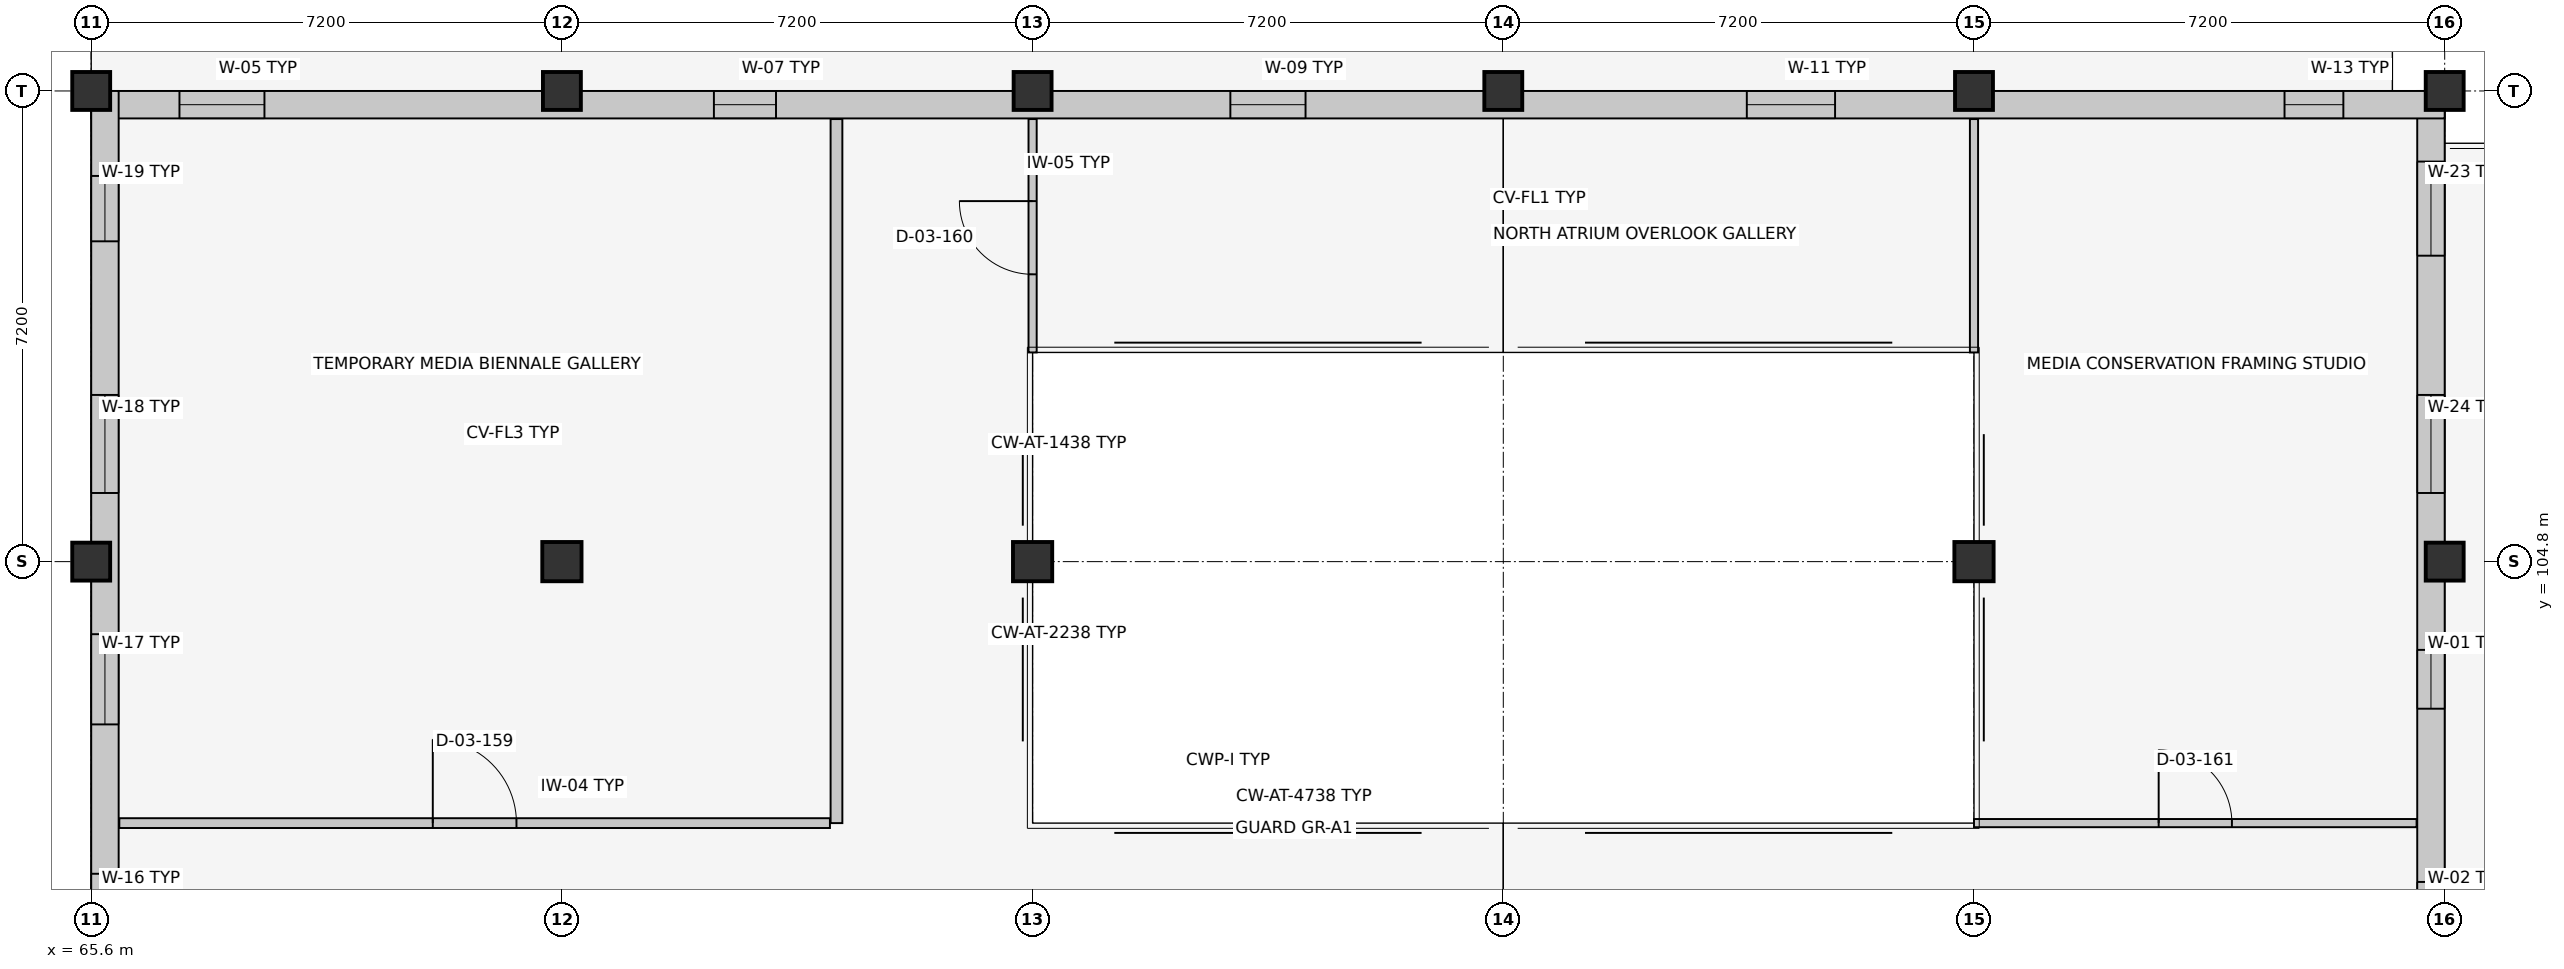
"""IFC4 building model, lengths in metres.
Left out: names, types, materials, properties, quantities, classifications, styles, units other than length and angle.
Written with IfcOpenShell. Run it as: python <this file> out.ifc"""

import sys

from ifc_helpers import new_model, si_unit, direction, frame, frame_2d, origin, origin_2d, place, context, subcontext, project, spatial, rectangle, extrude, element, fill, save


model = new_model("IFC4")
c1 = context("Model", 3, precision=1e-05, world=origin(), true_north=direction((0.0, 1.0)))
c2 = subcontext(c1, "Body", "Model", "MODEL_VIEW")
j1 = project(units=[si_unit("LENGTHUNIT", "METRE"), si_unit("PLANEANGLEUNIT", "RADIAN")], contexts=[c1])
p1 = place(None, origin())
s1 = spatial("IfcSite", under=j1, at=p1, CompositionType="ELEMENT")
p2 = place(p1, origin())
s2 = spatial("IfcBuilding", under=s1, at=p2, CompositionType="ELEMENT")
p3 = place(p2, frame((0.0, 0.0, 13.8)))
s3 = spatial("IfcBuildingStorey", under=s2, at=p3, CompositionType="ELEMENT", Elevation=13.8)
for number, where, z_axis, x_axis in (
    (1, (65.6, 104.8, 0.0), (0.0, 0.0, 1.0), (1.0, 0.0, 0.0)),
    (2, (65.6, 112.0, 0.0), (0.0, 0.0, 1.0), (1.0, 0.0, 0.0)),
):
    element("IfcColumn", number, at=place(p3, frame(where, z_axis=z_axis, x_axis=x_axis)), inside=s3, PredefinedType="COLUMN", context=c2, shape_type="SweptSolid", body=[
        extrude(rectangle(XDim=0.58, YDim=0.58, at=origin_2d()), origin(), (0.0, 0.0, 1.0), 4.2),
    ])
p4 = place(p3, frame((72.8, 104.8, 0.0), z_axis=(0.0, 0.0, 1.0), x_axis=(1.0, 0.0, 0.0)))
e3 = element("IfcColumn", 3, at=p4, inside=s3, PredefinedType="COLUMN", context=c2, shape_type="SweptSolid", body=[
    extrude(rectangle(XDim=0.6, YDim=0.6, at=origin_2d()), origin(), (0.0, 0.0, 1.0), 4.2),
])
p5 = place(p3, frame((72.8, 112.0, 0.0), z_axis=(0.0, 0.0, 1.0), x_axis=(1.0, 0.0, 0.0)))
e4 = element("IfcColumn", 4, at=p5, inside=s3, PredefinedType="COLUMN", context=c2, shape_type="SweptSolid", body=[
    extrude(rectangle(XDim=0.58, YDim=0.58, at=origin_2d()), origin(), (0.0, 0.0, 1.0), 4.2),
])
p6 = place(p3, frame((80.0, 104.8, 0.0), z_axis=(0.0, 0.0, 1.0), x_axis=(1.0, 0.0, 0.0)))
e5 = element("IfcColumn", 5, at=p6, inside=s3, PredefinedType="COLUMN", context=c2, shape_type="SweptSolid", body=[
    extrude(rectangle(XDim=0.6, YDim=0.6, at=origin_2d()), origin(), (0.0, 0.0, 1.0), 4.2),
])
for number, where, z_axis, x_axis in (
    (6, (80.0, 112.0, 0.0), (0.0, 0.0, 1.0), (1.0, 0.0, 0.0)),
    (7, (87.2, 112.0, 0.0), (0.0, 0.0, 1.0), (1.0, 0.0, 0.0)),
):
    element("IfcColumn", number, at=place(p3, frame(where, z_axis=z_axis, x_axis=x_axis)), inside=s3, PredefinedType="COLUMN", context=c2, shape_type="SweptSolid", body=[
        extrude(rectangle(XDim=0.58, YDim=0.58, at=origin_2d()), origin(), (0.0, 0.0, 1.0), 4.2),
    ])
p7 = place(p3, frame((94.4, 104.8, 0.0), z_axis=(0.0, 0.0, 1.0), x_axis=(1.0, 0.0, 0.0)))
e8 = element("IfcColumn", 8, at=p7, inside=s3, PredefinedType="COLUMN", context=c2, shape_type="SweptSolid", body=[
    extrude(rectangle(XDim=0.6, YDim=0.6, at=origin_2d()), origin(), (0.0, 0.0, 1.0), 4.2),
])
for number, where, z_axis, x_axis in (
    (9, (94.4, 112.0, 0.0), (0.0, 0.0, 1.0), (1.0, 0.0, 0.0)),
    (10, (101.6, 104.8, 0.0), (0.0, 0.0, 1.0), (1.0, 0.0, 0.0)),
    (11, (101.6, 112.0, 0.0), (0.0, 0.0, 1.0), (1.0, 0.0, 0.0)),
):
    element("IfcColumn", number, at=place(p3, frame(where, z_axis=z_axis, x_axis=x_axis)), inside=s3, PredefinedType="COLUMN", context=c2, shape_type="SweptSolid", body=[
        extrude(rectangle(XDim=0.58, YDim=0.58, at=origin_2d()), origin(), (0.0, 0.0, 1.0), 4.2),
    ])
p8 = place(p3, frame((101.39, 112.0, 0.0), z_axis=(0.0, 0.0, 1.0), x_axis=(0.0, -1.0, 0.0)))
e12 = element("IfcWall", 12, at=p8, inside=s3, PredefinedType="SOLIDWALL", context=c2, shape_type="SweptSolid", body=[
    extrude(rectangle(XDim=21.6, YDim=0.42, at=frame_2d((10.8, 0.0))), origin(), (0.0, 0.0, 1.0), 3.215),
])
p9 = place(p8, frame((17.3, 0.0, 0.0)))
e13 = element("IfcOpeningElement", 13, at=p9, cuts=e12, PredefinedType="OPENING", context=c2, shape_type="SweptSolid", body=[
    extrude(rectangle(XDim=1.4, YDim=2.2, at=frame_2d((0.7, 1.1))), frame((0.0, 0.222, 0.0), z_axis=(0.0, -1.0, 0.0), x_axis=(1.0, 0.0, 0.0)), (0.0, 0.0, 1.0), 0.444),
])
p10 = place(p8, frame((1.08, 0.0, 0.9)))
e14 = element("IfcOpeningElement", 14, at=p10, cuts=e12, PredefinedType="OPENING", context=c2, shape_type="SweptSolid", body=[
    extrude(rectangle(XDim=1.44, YDim=1.75, at=frame_2d((0.72, 0.875))), frame((0.0, 0.222, 0.0), z_axis=(0.0, -1.0, 0.0), x_axis=(1.0, 0.0, 0.0)), (0.0, 0.0, 1.0), 0.444),
])
p11 = place(p8, frame((4.65, 0.0, 0.9)))
e15 = element("IfcOpeningElement", 15, at=p11, cuts=e12, PredefinedType="OPENING", context=c2, shape_type="SweptSolid", body=[
    extrude(rectangle(XDim=1.5, YDim=1.75, at=frame_2d((0.75, 0.875))), frame((0.0, 0.222, 0.0), z_axis=(0.0, -1.0, 0.0), x_axis=(1.0, 0.0, 0.0)), (0.0, 0.0, 1.0), 0.444),
])
p12 = place(p8, frame((8.55, 0.0, 0.9)))
e16 = element("IfcOpeningElement", 16, at=p12, cuts=e12, PredefinedType="OPENING", context=c2, shape_type="SweptSolid", body=[
    extrude(rectangle(XDim=0.9, YDim=1.35, at=frame_2d((0.45, 0.675))), frame((0.0, 0.222, 0.0), z_axis=(0.0, -1.0, 0.0), x_axis=(1.0, 0.0, 0.0)), (0.0, 0.0, 1.0), 0.444),
])
p13 = place(p8, frame((12.1, 0.0, 0.9)))
e17 = element("IfcOpeningElement", 17, at=p13, cuts=e12, PredefinedType="OPENING", context=c2, shape_type="SweptSolid", body=[
    extrude(rectangle(XDim=1.0, YDim=1.35, at=frame_2d((0.5, 0.675))), frame((0.0, 0.222, 0.0), z_axis=(0.0, -1.0, 0.0), x_axis=(1.0, 0.0, 0.0)), (0.0, 0.0, 1.0), 0.444),
])
p14 = place(p3, frame((65.6, 111.79, 0.0), z_axis=(0.0, 0.0, 1.0), x_axis=(1.0, 0.0, 0.0)))
e18 = element("IfcWall", 18, at=p14, inside=s3, PredefinedType="SOLIDWALL", context=c2, shape_type="SweptSolid", body=[
    extrude(rectangle(XDim=36.0, YDim=0.42, at=frame_2d((18.0, 0.0))), origin(), (0.0, 0.0, 1.0), 3.175),
])
p15 = place(p14, frame((1.35, 0.0, 0.9)))
e19 = element("IfcOpeningElement", 19, at=p15, cuts=e18, PredefinedType="OPENING", context=c2, shape_type="SweptSolid", body=[
    extrude(rectangle(XDim=1.3, YDim=1.35, at=frame_2d((0.65, 0.675))), frame((0.0, 0.222, 0.0), z_axis=(0.0, -1.0, 0.0), x_axis=(1.0, 0.0, 0.0)), (0.0, 0.0, 1.0), 0.444),
])
p16 = place(p14, frame((9.525, 0.0, 0.9)))
e20 = element("IfcOpeningElement", 20, at=p16, cuts=e18, PredefinedType="OPENING", context=c2, shape_type="SweptSolid", body=[
    extrude(rectangle(XDim=0.95, YDim=1.45, at=frame_2d((0.475, 0.725))), frame((0.0, 0.222, 0.0), z_axis=(0.0, -1.0, 0.0), x_axis=(1.0, 0.0, 0.0)), (0.0, 0.0, 1.0), 0.444),
])
p17 = place(p14, frame((17.425, 0.0, 0.9)))
e21 = element("IfcOpeningElement", 21, at=p17, cuts=e18, PredefinedType="OPENING", context=c2, shape_type="SweptSolid", body=[
    extrude(rectangle(XDim=1.15, YDim=1.45, at=frame_2d((0.575, 0.725))), frame((0.0, 0.222, 0.0), z_axis=(0.0, -1.0, 0.0), x_axis=(1.0, 0.0, 0.0)), (0.0, 0.0, 1.0), 0.444),
])
p18 = place(p14, frame((25.325, 0.0, 0.9)))
e22 = element("IfcOpeningElement", 22, at=p18, cuts=e18, PredefinedType="OPENING", context=c2, shape_type="SweptSolid", body=[
    extrude(rectangle(XDim=1.35, YDim=1.45, at=frame_2d((0.675, 0.725))), frame((0.0, 0.222, 0.0), z_axis=(0.0, -1.0, 0.0), x_axis=(1.0, 0.0, 0.0)), (0.0, 0.0, 1.0), 0.444),
])
p19 = place(p14, frame((33.55, 0.0, 0.9)))
e23 = element("IfcOpeningElement", 23, at=p19, cuts=e18, PredefinedType="OPENING", context=c2, shape_type="SweptSolid", body=[
    extrude(rectangle(XDim=0.9, YDim=1.6, at=frame_2d((0.45, 0.8))), frame((0.0, 0.222, 0.0), z_axis=(0.0, -1.0, 0.0), x_axis=(1.0, 0.0, 0.0)), (0.0, 0.0, 1.0), 0.444),
])
p20 = place(p3, frame((65.81, 90.4, 0.0), z_axis=(0.0, 0.0, 1.0), x_axis=(0.0, 1.0, 0.0)))
e24 = element("IfcWall", 24, at=p20, inside=s3, PredefinedType="SOLIDWALL", context=c2, shape_type="SweptSolid", body=[
    extrude(rectangle(XDim=21.6, YDim=0.42, at=frame_2d((10.8, 0.0))), origin(), (0.0, 0.0, 1.0), 3.135),
])
p21 = place(p20, frame((1.275, 0.0, 0.9)))
e25 = element("IfcOpeningElement", 25, at=p21, cuts=e24, PredefinedType="OPENING", context=c2, shape_type="SweptSolid", body=[
    extrude(rectangle(XDim=1.05, YDim=1.6, at=frame_2d((0.525, 0.8))), frame((0.0, 0.222, 0.0), z_axis=(0.0, -1.0, 0.0), x_axis=(1.0, 0.0, 0.0)), (0.0, 0.0, 1.0), 0.444),
])
p22 = place(p20, frame((4.825, 0.0, 0.9)))
e26 = element("IfcOpeningElement", 26, at=p22, cuts=e24, PredefinedType="OPENING", context=c2, shape_type="SweptSolid", body=[
    extrude(rectangle(XDim=1.15, YDim=1.6, at=frame_2d((0.575, 0.8))), frame((0.0, 0.222, 0.0), z_axis=(0.0, -1.0, 0.0), x_axis=(1.0, 0.0, 0.0)), (0.0, 0.0, 1.0), 0.444),
])
p23 = place(p20, frame((8.375, 0.0, 0.9)))
e27 = element("IfcOpeningElement", 27, at=p23, cuts=e24, PredefinedType="OPENING", context=c2, shape_type="SweptSolid", body=[
    extrude(rectangle(XDim=1.25, YDim=1.6, at=frame_2d((0.625, 0.8))), frame((0.0, 0.222, 0.0), z_axis=(0.0, -1.0, 0.0), x_axis=(1.0, 0.0, 0.0)), (0.0, 0.0, 1.0), 0.444),
])
p24 = place(p20, frame((11.91, 0.0, 0.9)))
e28 = element("IfcOpeningElement", 28, at=p24, cuts=e24, PredefinedType="OPENING", context=c2, shape_type="SweptSolid", body=[
    extrude(rectangle(XDim=1.38, YDim=1.6, at=frame_2d((0.69, 0.8))), frame((0.0, 0.222, 0.0), z_axis=(0.0, -1.0, 0.0), x_axis=(1.0, 0.0, 0.0)), (0.0, 0.0, 1.0), 0.444),
])
p25 = place(p20, frame((15.45, 0.0, 0.9)))
e29 = element("IfcOpeningElement", 29, at=p25, cuts=e24, PredefinedType="OPENING", context=c2, shape_type="SweptSolid", body=[
    extrude(rectangle(XDim=1.5, YDim=1.6, at=frame_2d((0.75, 0.8))), frame((0.0, 0.222, 0.0), z_axis=(0.0, -1.0, 0.0), x_axis=(1.0, 0.0, 0.0)), (0.0, 0.0, 1.0), 0.444),
])
p26 = place(p20, frame((19.3, 0.0, 0.9)))
e30 = element("IfcOpeningElement", 30, at=p26, cuts=e24, PredefinedType="OPENING", context=c2, shape_type="SweptSolid", body=[
    extrude(rectangle(XDim=1.0, YDim=1.75, at=frame_2d((0.5, 0.875))), frame((0.0, 0.222, 0.0), z_axis=(0.0, -1.0, 0.0), x_axis=(1.0, 0.0, 0.0)), (0.0, 0.0, 1.0), 0.444),
])
p27 = place(p3, frame((77.0, 100.8, 0.0), z_axis=(0.0, 0.0, 1.0), x_axis=(0.0, 1.0, 0.0)))
e31 = element("IfcWall", 31, at=p27, inside=s3, PredefinedType="PARTITIONING", context=c2, shape_type="SweptSolid", body=[
    extrude(rectangle(XDim=10.77, YDim=0.18, at=frame_2d((5.385, 0.0))), origin(), (0.0, 0.0, 1.0), 3.88),
])
p28 = place(p3, frame((66.03, 100.8, 0.0), z_axis=(0.0, 0.0, 1.0), x_axis=(1.0, 0.0, 0.0)))
e32 = element("IfcWall", 32, at=p28, inside=s3, PredefinedType="PARTITIONING", context=c2, shape_type="SweptSolid", body=[
    extrude(rectangle(XDim=10.87, YDim=0.15, at=frame_2d((5.435, 0.0))), origin(), (0.0, 0.0, 1.0), 3.88),
])
p29 = place(p28, frame((4.795, 0.0, 0.0)))
e33 = element("IfcOpeningElement", 33, at=p29, cuts=e32, PredefinedType="OPENING", context=c2, shape_type="SweptSolid", body=[
    extrude(rectangle(XDim=1.28, YDim=2.2, at=frame_2d((0.64, 1.1))), frame((0.0, 0.087, 0.0), z_axis=(0.0, -1.0, 0.0), x_axis=(1.0, 0.0, 0.0)), (0.0, 0.0, 1.0), 0.174),
])
p30 = place(p3, frame((80.0, 108.0, 0.0), z_axis=(0.0, 0.0, 1.0), x_axis=(0.0, 1.0, 0.0)))
e34 = element("IfcWall", 34, at=p30, inside=s3, PredefinedType="PARTITIONING", context=c2, shape_type="SweptSolid", body=[
    extrude(rectangle(XDim=3.57, YDim=0.125, at=frame_2d((1.785, 0.0))), origin(), (0.0, 0.0, 1.0), 3.255),
])
p31 = place(p30, frame((1.195, 0.0, 0.0)))
e35 = element("IfcOpeningElement", 35, at=p31, cuts=e34, PredefinedType="OPENING", context=c2, shape_type="SweptSolid", body=[
    extrude(rectangle(XDim=1.12, YDim=2.15, at=frame_2d((0.56, 1.075))), frame((0.0, 0.074, 0.0), z_axis=(0.0, -1.0, 0.0), x_axis=(1.0, 0.0, 0.0)), (0.0, 0.0, 1.0), 0.149),
])
p32 = place(p3, frame((94.4, 108.0, 0.0), z_axis=(0.0, 0.0, 1.0), x_axis=(0.0, 1.0, 0.0)))
e36 = element("IfcWall", 36, at=p32, inside=s3, PredefinedType="PARTITIONING", context=c2, shape_type="SweptSolid", body=[
    extrude(rectangle(XDim=3.57, YDim=0.125, at=frame_2d((1.785, 0.0))), origin(), (0.0, 0.0, 1.0), 3.255),
])
p33 = place(p3, frame((94.4, 100.8, 0.0), z_axis=(0.0, 0.0, 1.0), x_axis=(1.0, 0.0, 0.0)))
e37 = element("IfcWall", 37, at=p33, inside=s3, PredefinedType="PARTITIONING", context=c2, shape_type="SweptSolid", body=[
    extrude(rectangle(XDim=6.77, YDim=0.125, at=frame_2d((3.385, 0.0))), origin(), (0.0, 0.0, 1.0), 3.96),
])
p34 = place(p33, frame((2.825, 0.0, 0.0)))
e38 = element("IfcOpeningElement", 38, at=p34, cuts=e37, PredefinedType="OPENING", context=c2, shape_type="SweptSolid", body=[
    extrude(rectangle(XDim=1.12, YDim=2.15, at=frame_2d((0.56, 1.075))), frame((0.0, 0.074, 0.0), z_axis=(0.0, -1.0, 0.0), x_axis=(1.0, 0.0, 0.0)), (0.0, 0.0, 1.0), 0.149),
])
p35 = place(p10, origin())
e39 = element("IfcWindow", 39, at=p35, inside=s3, PartitioningType="SINGLE_PANEL", PredefinedType="WINDOW", context=c2, shape_type="SweptSolid", body=[
    extrude(rectangle(XDim=1.44, YDim=1.75, at=frame_2d((0.72, 0.875))), frame((0.0, 0.03, 0.0), z_axis=(0.0, -1.0, 0.0), x_axis=(1.0, 0.0, 0.0)), (0.0, 0.0, 1.0), 0.06),
])
fill(e14, e39)
p36 = place(p11, origin())
e40 = element("IfcWindow", 40, at=p36, inside=s3, PartitioningType="SINGLE_PANEL", PredefinedType="WINDOW", context=c2, shape_type="SweptSolid", body=[
    extrude(rectangle(XDim=1.5, YDim=1.75, at=frame_2d((0.75, 0.875))), frame((0.0, 0.03, 0.0), z_axis=(0.0, -1.0, 0.0), x_axis=(1.0, 0.0, 0.0)), (0.0, 0.0, 1.0), 0.06),
])
fill(e15, e40)
p37 = place(p12, origin())
e41 = element("IfcWindow", 41, at=p37, inside=s3, PartitioningType="SINGLE_PANEL", PredefinedType="WINDOW", context=c2, shape_type="SweptSolid", body=[
    extrude(rectangle(XDim=0.9, YDim=1.35, at=frame_2d((0.45, 0.675))), frame((0.0, 0.03, 0.0), z_axis=(0.0, -1.0, 0.0), x_axis=(1.0, 0.0, 0.0)), (0.0, 0.0, 1.0), 0.06),
])
fill(e16, e41)
p38 = place(p13, origin())
e42 = element("IfcWindow", 42, at=p38, inside=s3, PartitioningType="SINGLE_PANEL", PredefinedType="WINDOW", context=c2, shape_type="SweptSolid", body=[
    extrude(rectangle(XDim=1.0, YDim=1.35, at=frame_2d((0.5, 0.675))), frame((0.0, 0.03, 0.0), z_axis=(0.0, -1.0, 0.0), x_axis=(1.0, 0.0, 0.0)), (0.0, 0.0, 1.0), 0.06),
])
fill(e17, e42)
p39 = place(p15, origin())
e43 = element("IfcWindow", 43, at=p39, inside=s3, PartitioningType="SINGLE_PANEL", PredefinedType="WINDOW", context=c2, shape_type="SweptSolid", body=[
    extrude(rectangle(XDim=1.3, YDim=1.35, at=frame_2d((0.65, 0.675))), frame((0.0, 0.03, 0.0), z_axis=(0.0, -1.0, 0.0), x_axis=(1.0, 0.0, 0.0)), (0.0, 0.0, 1.0), 0.06),
])
fill(e19, e43)
p40 = place(p16, origin())
e44 = element("IfcWindow", 44, at=p40, inside=s3, PartitioningType="SINGLE_PANEL", PredefinedType="WINDOW", context=c2, shape_type="SweptSolid", body=[
    extrude(rectangle(XDim=0.95, YDim=1.45, at=frame_2d((0.475, 0.725))), frame((0.0, 0.03, 0.0), z_axis=(0.0, -1.0, 0.0), x_axis=(1.0, 0.0, 0.0)), (0.0, 0.0, 1.0), 0.06),
])
fill(e20, e44)
p41 = place(p17, origin())
e45 = element("IfcWindow", 45, at=p41, inside=s3, PartitioningType="SINGLE_PANEL", PredefinedType="WINDOW", context=c2, shape_type="SweptSolid", body=[
    extrude(rectangle(XDim=1.15, YDim=1.45, at=frame_2d((0.575, 0.725))), frame((0.0, 0.03, 0.0), z_axis=(0.0, -1.0, 0.0), x_axis=(1.0, 0.0, 0.0)), (0.0, 0.0, 1.0), 0.06),
])
fill(e21, e45)
p42 = place(p18, origin())
e46 = element("IfcWindow", 46, at=p42, inside=s3, PartitioningType="SINGLE_PANEL", PredefinedType="WINDOW", context=c2, shape_type="SweptSolid", body=[
    extrude(rectangle(XDim=1.35, YDim=1.45, at=frame_2d((0.675, 0.725))), frame((0.0, 0.03, 0.0), z_axis=(0.0, -1.0, 0.0), x_axis=(1.0, 0.0, 0.0)), (0.0, 0.0, 1.0), 0.06),
])
fill(e22, e46)
p43 = place(p19, origin())
e47 = element("IfcWindow", 47, at=p43, inside=s3, PartitioningType="SINGLE_PANEL", PredefinedType="WINDOW", context=c2, shape_type="SweptSolid", body=[
    extrude(rectangle(XDim=0.9, YDim=1.6, at=frame_2d((0.45, 0.8))), frame((0.0, 0.03, 0.0), z_axis=(0.0, -1.0, 0.0), x_axis=(1.0, 0.0, 0.0)), (0.0, 0.0, 1.0), 0.06),
])
fill(e23, e47)
p44 = place(p23, origin())
e48 = element("IfcWindow", 48, at=p44, inside=s3, PartitioningType="SINGLE_PANEL", PredefinedType="WINDOW", context=c2, shape_type="SweptSolid", body=[
    extrude(rectangle(XDim=1.25, YDim=1.6, at=frame_2d((0.625, 0.8))), frame((0.0, 0.03, 0.0), z_axis=(0.0, -1.0, 0.0), x_axis=(1.0, 0.0, 0.0)), (0.0, 0.0, 1.0), 0.06),
])
fill(e27, e48)
p45 = place(p24, origin())
e49 = element("IfcWindow", 49, at=p45, inside=s3, PartitioningType="SINGLE_PANEL", PredefinedType="WINDOW", context=c2, shape_type="SweptSolid", body=[
    extrude(rectangle(XDim=1.38, YDim=1.6, at=frame_2d((0.69, 0.8))), frame((0.0, 0.03, 0.0), z_axis=(0.0, -1.0, 0.0), x_axis=(1.0, 0.0, 0.0)), (0.0, 0.0, 1.0), 0.06),
])
fill(e28, e49)
p46 = place(p25, origin())
e50 = element("IfcWindow", 50, at=p46, inside=s3, PartitioningType="SINGLE_PANEL", PredefinedType="WINDOW", context=c2, shape_type="SweptSolid", body=[
    extrude(rectangle(XDim=1.5, YDim=1.6, at=frame_2d((0.75, 0.8))), frame((0.0, 0.03, 0.0), z_axis=(0.0, -1.0, 0.0), x_axis=(1.0, 0.0, 0.0)), (0.0, 0.0, 1.0), 0.06),
])
fill(e29, e50)
p47 = place(p26, origin())
e51 = element("IfcWindow", 51, at=p47, inside=s3, PartitioningType="SINGLE_PANEL", PredefinedType="WINDOW", context=c2, shape_type="SweptSolid", body=[
    extrude(rectangle(XDim=1.0, YDim=1.75, at=frame_2d((0.5, 0.875))), frame((0.0, 0.03, 0.0), z_axis=(0.0, -1.0, 0.0), x_axis=(1.0, 0.0, 0.0)), (0.0, 0.0, 1.0), 0.06),
])
fill(e30, e51)
p48 = place(p29, origin())
e52 = element("IfcDoor", 52, at=p48, inside=s3, OperationType="SINGLE_SWING_LEFT", PredefinedType="DOOR", context=c2, shape_type="SweptSolid", body=[
    extrude(rectangle(XDim=1.28, YDim=2.2, at=frame_2d((0.64, 1.1))), frame((0.0, 0.025, 0.0), z_axis=(0.0, -1.0, 0.0), x_axis=(1.0, 0.0, 0.0)), (0.0, 0.0, 1.0), 0.05),
])
fill(e33, e52)
p49 = place(p31, origin())
e53 = element("IfcDoor", 53, at=p49, inside=s3, OperationType="SINGLE_SWING_RIGHT", PredefinedType="DOOR", context=c2, shape_type="SweptSolid", body=[
    extrude(rectangle(XDim=1.12, YDim=2.15, at=frame_2d((0.56, 1.075))), frame((0.0, 0.025, 0.0), z_axis=(0.0, -1.0, 0.0), x_axis=(1.0, 0.0, 0.0)), (0.0, 0.0, 1.0), 0.05),
])
fill(e35, e53)
p50 = place(p34, origin())
e54 = element("IfcDoor", 54, at=p50, inside=s3, OperationType="SINGLE_SWING_LEFT", PredefinedType="DOOR", context=c2, shape_type="SweptSolid", body=[
    extrude(rectangle(XDim=1.12, YDim=2.15, at=frame_2d((0.56, 1.075))), frame((0.0, 0.025, 0.0), z_axis=(0.0, -1.0, 0.0), x_axis=(1.0, 0.0, 0.0)), (0.0, 0.0, 1.0), 0.05),
])
fill(e38, e54)
save(model, sys.argv[1])
